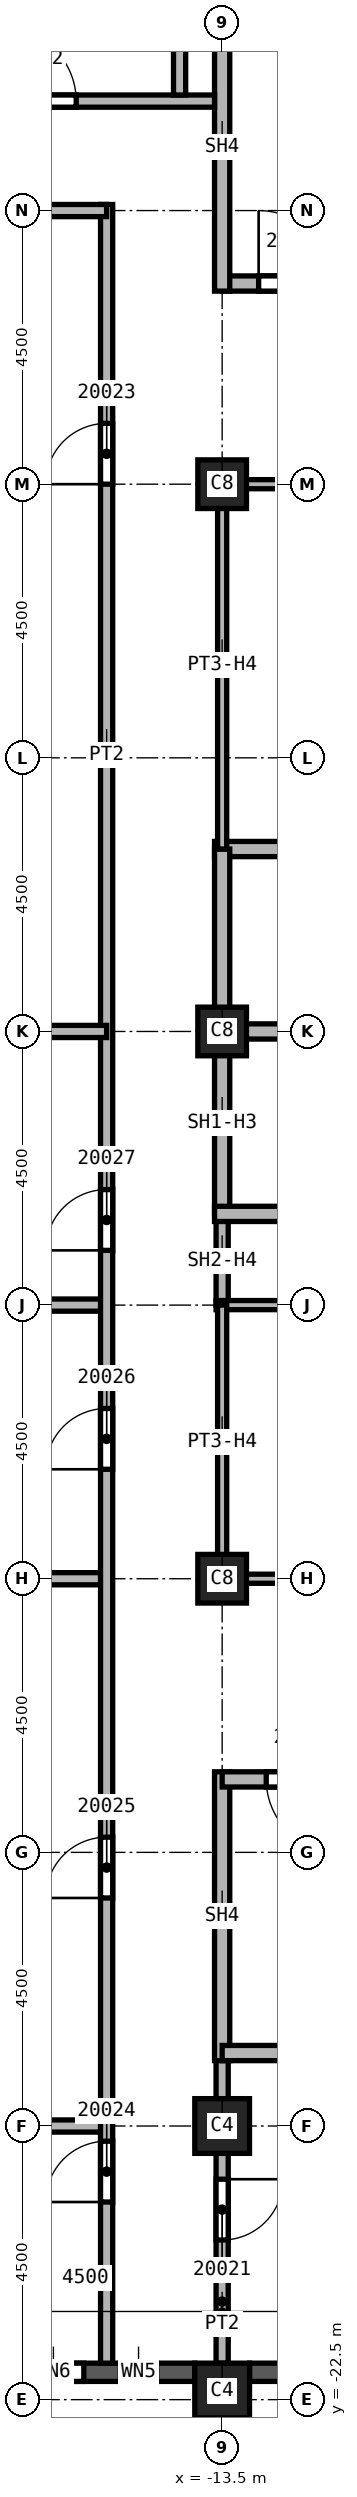
"""IFC4 building model, lengths in metres.
Left out: names, types, materials, properties, quantities, classifications, styles, units other than length and angle.
Written with IfcOpenShell. Run it as: python <this file> out.ifc"""

import sys

from ifc_helpers import new_model, si_unit, direction, frame, frame_2d, origin, origin_2d, place, context, subcontext, project, spatial, rectangle, extrude, element, fill, save


model = new_model("IFC4")
c1 = context("Model", 3, precision=1e-05, world=origin(), true_north=direction((0.0, 1.0)))
c2 = subcontext(c1, "Body", "Model", "MODEL_VIEW")
j1 = project(units=[si_unit("LENGTHUNIT", "METRE"), si_unit("PLANEANGLEUNIT", "RADIAN")], contexts=[c1])
p1 = place(None, origin())
s1 = spatial("IfcSite", under=j1, at=p1, CompositionType="ELEMENT")
p2 = place(p1, origin())
s2 = spatial("IfcBuilding", under=s1, at=p2, CompositionType="ELEMENT")
p3 = place(p2, frame((0.0, 0.0, 286.0)))
s3 = spatial("IfcBuildingStorey", under=s2, at=p3, CompositionType="ELEMENT", Elevation=286.0)
p4 = place(p3, frame((-13.5, -18.0, 0.0), z_axis=(0.0, 0.0, 1.0), x_axis=(1.0, 0.0, 0.0)))
e1 = element("IfcColumn", 1, at=p4, inside=s3, PredefinedType="COLUMN", context=c2, shape_type="SweptSolid", body=[
    extrude(rectangle(XDim=0.9, YDim=0.9, at=origin_2d()), origin(), (0.0, 0.0, 1.0), 3.72),
])
for number, where, z_axis, x_axis in (
    (2, (-13.5, 0.0, 0.0), (0.0, 0.0, 1.0), (1.0, 0.0, 0.0)),
    (3, (-13.5, 9.0, 0.0), (0.0, 0.0, 1.0), (1.0, 0.0, 0.0)),
    (4, (-13.5, -9.0, 0.0), (0.0, 0.0, 1.0), (1.0, 0.0, 0.0)),
):
    element("IfcColumn", number, at=place(p3, frame(where, z_axis=z_axis, x_axis=x_axis)), inside=s3, PredefinedType="COLUMN", context=c2, shape_type="SweptSolid", body=[
        extrude(rectangle(XDim=0.8, YDim=0.8, at=origin_2d()), origin(), (0.0, 0.0, 1.0), 3.72),
    ])
p5 = place(p3, frame((-13.5, -22.35, 0.0), z_axis=(0.0, 0.0, 1.0), x_axis=(1.0, 0.0, 0.0)))
e5 = element("IfcColumn", 5, at=p5, inside=s3, PredefinedType="COLUMN", context=c2, shape_type="SweptSolid", body=[
    extrude(rectangle(XDim=0.9, YDim=0.9, at=origin_2d()), origin(), (0.0, 0.0, 1.0), 3.72),
])
p6 = place(p3, frame((-17.55, -22.05, 0.0), z_axis=(0.0, 0.0, 1.0), x_axis=(1.0, 0.0, 0.0)))
e6 = element("IfcWall", 6, at=p6, inside=s3, PredefinedType="SOLIDWALL", context=c2, shape_type="SweptSolid", body=[
    extrude(rectangle(XDim=3.6, YDim=0.3, at=frame_2d((1.8, 0.0))), origin(), (0.0, 0.0, 1.0), 3.12),
])
p7 = place(p6, frame((0.775, 0.0, 0.8)))
e7 = element("IfcOpeningElement", 7, at=p7, cuts=e6, PredefinedType="OPENING", context=c2, shape_type="SweptSolid", body=[
    extrude(rectangle(XDim=1.0, YDim=1.95, at=frame_2d((0.5, 0.975))), frame((0.0, 0.15, 0.0), z_axis=(0.0, -1.0, 0.0), x_axis=(1.0, 0.0, 0.0)), (0.0, 0.0, 1.0), 0.3),
])
p8 = place(p6, frame((2.375, 0.0, 0.8)))
e8 = element("IfcOpeningElement", 8, at=p8, cuts=e6, PredefinedType="OPENING", context=c2, shape_type="SweptSolid", body=[
    extrude(rectangle(XDim=0.6, YDim=1.95, at=frame_2d((0.3, 0.975))), frame((0.0, 0.15, 0.0), z_axis=(0.0, -1.0, 0.0), x_axis=(1.0, 0.0, 0.0)), (0.0, 0.0, 1.0), 0.3),
])
p9 = place(p3, frame((-13.05, -22.05, 0.0), z_axis=(0.0, 0.0, 1.0), x_axis=(1.0, 0.0, 0.0)))
e9 = element("IfcWall", 9, at=p9, inside=s3, PredefinedType="SOLIDWALL", context=c2, shape_type="SweptSolid", body=[
    extrude(rectangle(XDim=3.6, YDim=0.3, at=frame_2d((1.8, 0.0))), origin(), (0.0, 0.0, 1.0), 3.12),
])
p10 = place(p9, frame((0.6, 0.0, 0.8)))
e10 = element("IfcOpeningElement", 10, at=p10, cuts=e9, PredefinedType="OPENING", context=c2, shape_type="SweptSolid", body=[
    extrude(rectangle(XDim=2.4, YDim=1.95, at=frame_2d((1.2, 0.975))), frame((0.0, 0.15, 0.0), z_axis=(0.0, -1.0, 0.0), x_axis=(1.0, 0.0, 0.0)), (0.0, 0.0, 1.0), 0.3),
])
for number, where, z_axis, x_axis in (
    (11, (-26.55, -9.0, 0.0), (0.0, 0.0, 1.0), (1.0, 0.0, 0.0)),
    (12, (-26.55, -4.5, 0.0), (0.0, 0.0, 1.0), (1.0, 0.0, 0.0)),
):
    element("IfcWall", number, at=place(p3, frame(where, z_axis=z_axis, x_axis=x_axis)), inside=s3, PredefinedType="PARTITIONING", context=c2, shape_type="SweptSolid", body=[
        extrude(rectangle(XDim=11.15, YDim=0.2, at=frame_2d((5.575, 0.0))), origin(), (0.0, 0.0, 1.0), 3.72),
    ])
p11 = place(p3, frame((-24.3, -18.0, 0.0), z_axis=(0.0, 0.0, 1.0), x_axis=(1.0, 0.0, 0.0)))
e13 = element("IfcWall", 13, at=p11, inside=s3, PredefinedType="PARTITIONING", context=c2, shape_type="SweptSolid", body=[
    extrude(rectangle(XDim=8.9, YDim=0.2, at=frame_2d((4.45, 0.0))), origin(), (0.0, 0.0, 1.0), 3.72),
])
p12 = place(p3, frame((-15.4, -21.9, 0.0), z_axis=(0.0, 0.0, 1.0), x_axis=(0.0, 1.0, 0.0)))
e14 = element("IfcWall", 14, at=p12, inside=s3, PredefinedType="PARTITIONING", context=c2, shape_type="SweptSolid", body=[
    extrude(rectangle(XDim=35.5, YDim=0.2, at=frame_2d((17.75, 0.0))), origin(), (0.0, 0.0, 1.0), 3.72),
])
p13 = place(p12, frame((30.9, 0.0, 0.0)))
e15 = element("IfcOpeningElement", 15, at=p13, cuts=e14, PredefinedType="OPENING", context=c2, shape_type="SweptSolid", body=[
    extrude(rectangle(XDim=1.0, YDim=2.1, at=frame_2d((0.5, 1.05))), frame((0.0, 0.1, 0.0), z_axis=(0.0, -1.0, 0.0), x_axis=(1.0, 0.0, 0.0)), (0.0, 0.0, 1.0), 0.2),
])
p14 = place(p12, frame((2.65, 0.0, 0.0)))
e16 = element("IfcOpeningElement", 16, at=p14, cuts=e14, PredefinedType="OPENING", context=c2, shape_type="SweptSolid", body=[
    extrude(rectangle(XDim=1.0, YDim=2.1, at=frame_2d((0.5, 1.05))), frame((0.0, 0.1, 0.0), z_axis=(0.0, -1.0, 0.0), x_axis=(1.0, 0.0, 0.0)), (0.0, 0.0, 1.0), 0.2),
])
p15 = place(p12, frame((7.65, 0.0, 0.0)))
e17 = element("IfcOpeningElement", 17, at=p15, cuts=e14, PredefinedType="OPENING", context=c2, shape_type="SweptSolid", body=[
    extrude(rectangle(XDim=1.0, YDim=2.1, at=frame_2d((0.5, 1.05))), frame((0.0, 0.1, 0.0), z_axis=(0.0, -1.0, 0.0), x_axis=(1.0, 0.0, 0.0)), (0.0, 0.0, 1.0), 0.2),
])
p16 = place(p12, frame((14.7, 0.0, 0.0)))
e18 = element("IfcOpeningElement", 18, at=p16, cuts=e14, PredefinedType="OPENING", context=c2, shape_type="SweptSolid", body=[
    extrude(rectangle(XDim=1.0, YDim=2.1, at=frame_2d((0.5, 1.05))), frame((0.0, 0.1, 0.0), z_axis=(0.0, -1.0, 0.0), x_axis=(1.0, 0.0, 0.0)), (0.0, 0.0, 1.0), 0.2),
])
p17 = place(p12, frame((18.3, 0.0, 0.0)))
e19 = element("IfcOpeningElement", 19, at=p17, cuts=e14, PredefinedType="OPENING", context=c2, shape_type="SweptSolid", body=[
    extrude(rectangle(XDim=1.0, YDim=2.1, at=frame_2d((0.5, 1.05))), frame((0.0, 0.1, 0.0), z_axis=(0.0, -1.0, 0.0), x_axis=(1.0, 0.0, 0.0)), (0.0, 0.0, 1.0), 0.2),
])
p18 = place(p3, frame((-15.4, 0.0, 0.0), z_axis=(0.0, 0.0, 1.0), x_axis=(-1.0, 0.0, 0.0)))
e20 = element("IfcWall", 20, at=p18, inside=s3, PredefinedType="PARTITIONING", context=c2, shape_type="SweptSolid", body=[
    extrude(rectangle(XDim=11.15, YDim=0.2, at=frame_2d((5.575, 0.0))), origin(), (0.0, 0.0, 1.0), 3.72),
])
p19 = place(p3, frame((-15.4, 13.5, 0.0), z_axis=(0.0, 0.0, 1.0), x_axis=(-1.0, 0.0, 0.0)))
e21 = element("IfcWall", 21, at=p19, inside=s3, PredefinedType="PARTITIONING", context=c2, shape_type="SweptSolid", body=[
    extrude(rectangle(XDim=6.6, YDim=0.2, at=frame_2d((3.3, 0.0))), origin(), (0.0, 0.0, 1.0), 3.72),
])
p20 = place(p3, frame((-13.5, -16.675, 0.0), z_axis=(0.0, 0.0, 1.0), x_axis=(0.0, -1.0, 0.0)))
e22 = element("IfcWall", 22, at=p20, inside=s3, PredefinedType="PARTITIONING", context=c2, shape_type="SweptSolid", body=[
    extrude(rectangle(XDim=5.225, YDim=0.2, at=frame_2d((2.612, 0.0))), origin(), (0.0, 0.0, 1.0), 3.72),
])
p21 = place(p20, frame((2.2, 0.0, 0.0)))
e23 = element("IfcOpeningElement", 23, at=p21, cuts=e22, PredefinedType="OPENING", context=c2, shape_type="SweptSolid", body=[
    extrude(rectangle(XDim=1.0, YDim=2.1, at=frame_2d((0.5, 1.05))), frame((0.0, 0.1, 0.0), z_axis=(0.0, -1.0, 0.0), x_axis=(1.0, 0.0, 0.0)), (0.0, 0.0, 1.0), 0.2),
])
p22 = place(p3, frame((-13.5, -4.5, 0.0), z_axis=(0.0, 0.0, 1.0), x_axis=(0.0, 1.0, 0.0)))
e24 = element("IfcWall", 24, at=p22, inside=s3, PredefinedType="SOLIDWALL", context=c2, shape_type="SweptSolid", body=[
    extrude(rectangle(XDim=1.5, YDim=0.2, at=frame_2d((0.75, 0.0))), origin(), (0.0, 0.0, 1.0), 3.042),
])
p23 = place(p3, frame((-13.625, 0.0, 0.0), z_axis=(0.0, 0.0, 1.0), x_axis=(1.0, 0.0, 0.0)))
e25 = element("IfcWall", 25, at=p23, inside=s3, PredefinedType="SOLIDWALL", context=c2, shape_type="SweptSolid", body=[
    extrude(rectangle(XDim=3.125, YDim=0.25, at=frame_2d((1.562, 0.0))), origin(), (0.0, 0.0, 1.0), 3.72),
])
p24 = place(p3, frame((-13.625, 3.0, 0.0), z_axis=(0.0, 0.0, 1.0), x_axis=(1.0, 0.0, 0.0)))
e26 = element("IfcWall", 26, at=p24, inside=s3, PredefinedType="SOLIDWALL", context=c2, shape_type="SweptSolid", body=[
    extrude(rectangle(XDim=9.25, YDim=0.25, at=frame_2d((4.625, 0.0))), origin(), (0.0, 0.0, 1.0), 3.72),
])
p25 = place(p24, frame((3.25, 0.0, 0.0)))
e27 = element("IfcOpeningElement", 27, at=p25, cuts=e26, PredefinedType="OPENING", context=c2, shape_type="SweptSolid", body=[
    extrude(rectangle(XDim=1.1, YDim=2.1, at=frame_2d((0.55, 1.05))), frame((0.0, 0.125, 0.0), z_axis=(0.0, -1.0, 0.0), x_axis=(1.0, 0.0, 0.0)), (0.0, 0.0, 1.0), 0.25),
])
p26 = place(p3, frame((-13.5, -3.0, 0.0), z_axis=(0.0, 0.0, 1.0), x_axis=(0.0, 1.0, 0.0)))
e28 = element("IfcWall", 28, at=p26, inside=s3, PredefinedType="SOLIDWALL", context=c2, shape_type="SweptSolid", body=[
    extrude(rectangle(XDim=6.0, YDim=0.25, at=frame_2d((3.0, 0.0))), origin(), (0.0, 0.0, 1.0), 3.042),
])
p27 = place(p3, frame((-13.625, -3.0, 0.0), z_axis=(0.0, 0.0, 1.0), x_axis=(1.0, 0.0, 0.0)))
e29 = element("IfcWall", 29, at=p27, inside=s3, PredefinedType="SOLIDWALL", context=c2, shape_type="SweptSolid", body=[
    extrude(rectangle(XDim=6.125, YDim=0.25, at=frame_2d((3.062, 0.0))), origin(), (0.0, 0.0, 1.0), 3.72),
])
p28 = place(p27, frame((3.25, 0.0, 0.0)))
e30 = element("IfcOpeningElement", 30, at=p28, cuts=e29, PredefinedType="OPENING", context=c2, shape_type="SweptSolid", body=[
    extrude(rectangle(XDim=1.1, YDim=2.1, at=frame_2d((0.55, 1.05))), frame((0.0, 0.125, 0.0), z_axis=(0.0, -1.0, 0.0), x_axis=(1.0, 0.0, 0.0)), (0.0, 0.0, 1.0), 0.25),
])
p29 = place(p3, frame((-13.5, -12.175, 0.0), z_axis=(0.0, 0.0, 1.0), x_axis=(0.0, -1.0, 0.0)))
e31 = element("IfcWall", 31, at=p29, inside=s3, PredefinedType="SOLIDWALL", context=c2, shape_type="SweptSolid", body=[
    extrude(rectangle(XDim=4.75, YDim=0.25, at=frame_2d((2.375, 0.0))), origin(), (0.0, 0.0, 1.0), 3.72),
])
p30 = place(p3, frame((-13.5, 12.3, 0.0), z_axis=(0.0, 0.0, 1.0), x_axis=(1.0, 0.0, 0.0)))
e32 = element("IfcWall", 32, at=p30, inside=s3, PredefinedType="SOLIDWALL", context=c2, shape_type="SweptSolid", body=[
    extrude(rectangle(XDim=9.125, YDim=0.25, at=frame_2d((4.562, 0.0))), origin(), (0.0, 0.0, 1.0), 3.72),
])
p31 = place(p30, frame((0.6, 0.0, 0.0)))
e33 = element("IfcOpeningElement", 33, at=p31, cuts=e32, PredefinedType="OPENING", context=c2, shape_type="SweptSolid", body=[
    extrude(rectangle(XDim=1.2, YDim=2.1, at=frame_2d((0.6, 1.05))), frame((0.0, 0.125, 0.0), z_axis=(0.0, -1.0, 0.0), x_axis=(1.0, 0.0, 0.0)), (0.0, 0.0, 1.0), 0.25),
])
p32 = place(p3, frame((-13.5, 16.78, 0.0), z_axis=(0.0, 0.0, 1.0), x_axis=(0.0, -1.0, 0.0)))
e34 = element("IfcWall", 34, at=p32, inside=s3, PredefinedType="SOLIDWALL", context=c2, shape_type="SweptSolid", body=[
    extrude(rectangle(XDim=4.605, YDim=0.25, at=frame_2d((2.302, 0.0))), origin(), (0.0, 0.0, 1.0), 3.72),
])
p33 = place(p3, frame((-4.5, -16.8, 0.0), z_axis=(0.0, 0.0, 1.0), x_axis=(-1.0, 0.0, 0.0)))
e35 = element("IfcWall", 35, at=p33, inside=s3, PredefinedType="SOLIDWALL", context=c2, shape_type="SweptSolid", body=[
    extrude(rectangle(XDim=9.0, YDim=0.25, at=frame_2d((4.5, 0.0))), origin(), (0.0, 0.0, 1.0), 3.72),
])
p34 = place(p3, frame((-4.375, -12.3, 0.0), z_axis=(0.0, 0.0, 1.0), x_axis=(-1.0, 0.0, 0.0)))
e36 = element("IfcWall", 36, at=p34, inside=s3, PredefinedType="SOLIDWALL", context=c2, shape_type="SweptSolid", body=[
    extrude(rectangle(XDim=9.125, YDim=0.25, at=frame_2d((4.562, 0.0))), origin(), (0.0, 0.0, 1.0), 3.72),
])
p35 = place(p34, frame((7.2, 0.0, 0.0)))
e37 = element("IfcOpeningElement", 37, at=p35, cuts=e36, PredefinedType="OPENING", context=c2, shape_type="SweptSolid", body=[
    extrude(rectangle(XDim=1.2, YDim=2.1, at=frame_2d((0.6, 1.05))), frame((0.0, 0.125, 0.0), z_axis=(0.0, -1.0, 0.0), x_axis=(1.0, 0.0, 0.0)), (0.0, 0.0, 1.0), 0.25),
])
p36 = place(p3, frame((-13.6, -4.5, 0.0), z_axis=(0.0, 0.0, 1.0), x_axis=(1.0, 0.0, 0.0)))
e38 = element("IfcWall", 38, at=p36, inside=s3, PredefinedType="PARTITIONING", context=c2, shape_type="SweptSolid", body=[
    extrude(rectangle(XDim=3.1, YDim=0.15, at=frame_2d((1.55, 0.0))), origin(), (0.0, 0.0, 1.0), 3.72),
])
p37 = place(p3, frame((-13.5, -9.075, 0.0), z_axis=(0.0, 0.0, 1.0), x_axis=(0.0, 1.0, 0.0)))
e39 = element("IfcWall", 39, at=p37, inside=s3, PredefinedType="PARTITIONING", context=c2, shape_type="SweptSolid", body=[
    extrude(rectangle(XDim=4.575, YDim=0.15, at=frame_2d((2.288, 0.0))), origin(), (0.0, 0.0, 1.0), 3.042),
])
p38 = place(p3, frame((-13.5, 3.0, 0.0), z_axis=(0.0, 0.0, 1.0), x_axis=(0.0, 1.0, 0.0)))
e40 = element("IfcWall", 40, at=p38, inside=s3, PredefinedType="PARTITIONING", context=c2, shape_type="SweptSolid", body=[
    extrude(rectangle(XDim=6.075, YDim=0.15, at=frame_2d((3.038, 0.0))), origin(), (0.0, 0.0, 1.0), 3.042),
])
for number, where, z_axis, x_axis in (
    (41, (-13.5, 9.0, 0.0), (0.0, 0.0, 1.0), (1.0, 0.0, 0.0)),
    (42, (-10.5, -9.0, 0.0), (0.0, 0.0, 1.0), (-1.0, 0.0, 0.0)),
):
    element("IfcWall", number, at=place(p3, frame(where, z_axis=z_axis, x_axis=x_axis)), inside=s3, PredefinedType="PARTITIONING", context=c2, shape_type="SweptSolid", body=[
        extrude(rectangle(XDim=3.0, YDim=0.15, at=frame_2d((1.5, 0.0))), origin(), (0.0, 0.0, 1.0), 3.042),
    ])
p39 = place(p3, frame((-21.9, 15.3, 0.0), z_axis=(0.0, 0.0, 1.0), x_axis=(1.0, 0.0, 0.0)))
e43 = element("IfcWall", 43, at=p39, inside=s3, PredefinedType="SOLIDWALL", context=c2, shape_type="SweptSolid", body=[
    extrude(rectangle(XDim=8.275, YDim=0.2, at=frame_2d((4.137, 0.0))), origin(), (0.0, 0.0, 1.0), 3.72),
])
p40 = place(p39, frame((4.8, 0.0, 0.0)))
e44 = element("IfcOpeningElement", 44, at=p40, cuts=e43, PredefinedType="OPENING", context=c2, shape_type="SweptSolid", body=[
    extrude(rectangle(XDim=1.2, YDim=2.1, at=frame_2d((0.6, 1.05))), frame((0.0, 0.1, 0.0), z_axis=(0.0, -1.0, 0.0), x_axis=(1.0, 0.0, 0.0)), (0.0, 0.0, 1.0), 0.2),
])
p41 = place(p3, frame((-14.2, 15.4, 0.0), z_axis=(0.0, 0.0, 1.0), x_axis=(0.0, 1.0, 0.0)))
e45 = element("IfcWall", 45, at=p41, inside=s3, PredefinedType="SOLIDWALL", context=c2, shape_type="SweptSolid", body=[
    extrude(rectangle(XDim=5.9, YDim=0.2, at=frame_2d((2.95, 0.0))), origin(), (0.0, 0.0, 1.0), 3.72),
])
p42 = place(p31, origin())
e46 = element("IfcDoor", 46, at=p42, inside=s3, OperationType="SINGLE_SWING_LEFT", PredefinedType="DOOR", context=c2, shape_type="SweptSolid", body=[
    extrude(rectangle(XDim=1.2, YDim=2.1, at=frame_2d((0.6, 1.05))), frame((0.0, 0.025, 0.0), z_axis=(0.0, -1.0, 0.0), x_axis=(1.0, 0.0, 0.0)), (0.0, 0.0, 1.0), 0.05),
])
fill(e33, e46)
p43 = place(p35, origin())
e47 = element("IfcDoor", 47, at=p43, inside=s3, OperationType="SINGLE_SWING_RIGHT", PredefinedType="DOOR", context=c2, shape_type="SweptSolid", body=[
    extrude(rectangle(XDim=1.2, YDim=2.1, at=frame_2d((0.6, 1.05))), frame((0.0, 0.025, 0.0), z_axis=(0.0, -1.0, 0.0), x_axis=(1.0, 0.0, 0.0)), (0.0, 0.0, 1.0), 0.05),
])
fill(e37, e47)
p44 = place(p21, origin())
e48 = element("IfcDoor", 48, at=p44, inside=s3, OperationType="SINGLE_SWING_RIGHT", PredefinedType="DOOR", context=c2, shape_type="SweptSolid", body=[
    extrude(rectangle(XDim=1.0, YDim=2.1, at=frame_2d((0.5, 1.05))), frame((0.0, 0.025, 0.0), z_axis=(0.0, -1.0, 0.0), x_axis=(1.0, 0.0, 0.0)), (0.0, 0.0, 1.0), 0.05),
])
fill(e23, e48)
p45 = place(p13, origin())
e49 = element("IfcDoor", 49, at=p45, inside=s3, OperationType="SINGLE_SWING_RIGHT", PredefinedType="DOOR", context=c2, shape_type="SweptSolid", body=[
    extrude(rectangle(XDim=1.0, YDim=2.1, at=frame_2d((0.5, 1.05))), frame((0.0, 0.025, 0.0), z_axis=(0.0, -1.0, 0.0), x_axis=(1.0, 0.0, 0.0)), (0.0, 0.0, 1.0), 0.05),
])
fill(e15, e49)
p46 = place(p14, origin())
e50 = element("IfcDoor", 50, at=p46, inside=s3, OperationType="SINGLE_SWING_LEFT", PredefinedType="DOOR", context=c2, shape_type="SweptSolid", body=[
    extrude(rectangle(XDim=1.0, YDim=2.1, at=frame_2d((0.5, 1.05))), frame((0.0, 0.025, 0.0), z_axis=(0.0, -1.0, 0.0), x_axis=(1.0, 0.0, 0.0)), (0.0, 0.0, 1.0), 0.05),
])
fill(e16, e50)
p47 = place(p15, origin())
e51 = element("IfcDoor", 51, at=p47, inside=s3, OperationType="SINGLE_SWING_RIGHT", PredefinedType="DOOR", context=c2, shape_type="SweptSolid", body=[
    extrude(rectangle(XDim=1.0, YDim=2.1, at=frame_2d((0.5, 1.05))), frame((0.0, 0.025, 0.0), z_axis=(0.0, -1.0, 0.0), x_axis=(1.0, 0.0, 0.0)), (0.0, 0.0, 1.0), 0.05),
])
fill(e17, e51)
p48 = place(p16, origin())
e52 = element("IfcDoor", 52, at=p48, inside=s3, OperationType="SINGLE_SWING_LEFT", PredefinedType="DOOR", context=c2, shape_type="SweptSolid", body=[
    extrude(rectangle(XDim=1.0, YDim=2.1, at=frame_2d((0.5, 1.05))), frame((0.0, 0.025, 0.0), z_axis=(0.0, -1.0, 0.0), x_axis=(1.0, 0.0, 0.0)), (0.0, 0.0, 1.0), 0.05),
])
fill(e18, e52)
p49 = place(p17, origin())
e53 = element("IfcDoor", 53, at=p49, inside=s3, OperationType="SINGLE_SWING_RIGHT", PredefinedType="DOOR", context=c2, shape_type="SweptSolid", body=[
    extrude(rectangle(XDim=1.0, YDim=2.1, at=frame_2d((0.5, 1.05))), frame((0.0, 0.025, 0.0), z_axis=(0.0, -1.0, 0.0), x_axis=(1.0, 0.0, 0.0)), (0.0, 0.0, 1.0), 0.05),
])
fill(e19, e53)
p50 = place(p40, origin())
e54 = element("IfcDoor", 54, at=p50, inside=s3, OperationType="SINGLE_SWING_RIGHT", PredefinedType="DOOR", context=c2, shape_type="SweptSolid", body=[
    extrude(rectangle(XDim=1.2, YDim=2.1, at=frame_2d((0.6, 1.05))), frame((0.0, 0.025, 0.0), z_axis=(0.0, -1.0, 0.0), x_axis=(1.0, 0.0, 0.0)), (0.0, 0.0, 1.0), 0.05),
])
fill(e44, e54)
p51 = place(p7, origin())
e55 = element("IfcWindow", 55, at=p51, inside=s3, PartitioningType="SINGLE_PANEL", PredefinedType="WINDOW", context=c2, shape_type="SweptSolid", body=[
    extrude(rectangle(XDim=1.0, YDim=1.95, at=frame_2d((0.5, 0.975))), frame((0.0, 0.03, 0.0), z_axis=(0.0, -1.0, 0.0), x_axis=(1.0, 0.0, 0.0)), (0.0, 0.0, 1.0), 0.06),
])
fill(e7, e55)
p52 = place(p8, origin())
e56 = element("IfcWindow", 56, at=p52, inside=s3, PartitioningType="SINGLE_PANEL", PredefinedType="WINDOW", context=c2, shape_type="SweptSolid", body=[
    extrude(rectangle(XDim=0.6, YDim=1.95, at=frame_2d((0.3, 0.975))), frame((0.0, 0.03, 0.0), z_axis=(0.0, -1.0, 0.0), x_axis=(1.0, 0.0, 0.0)), (0.0, 0.0, 1.0), 0.06),
])
fill(e8, e56)
save(model, sys.argv[1])
